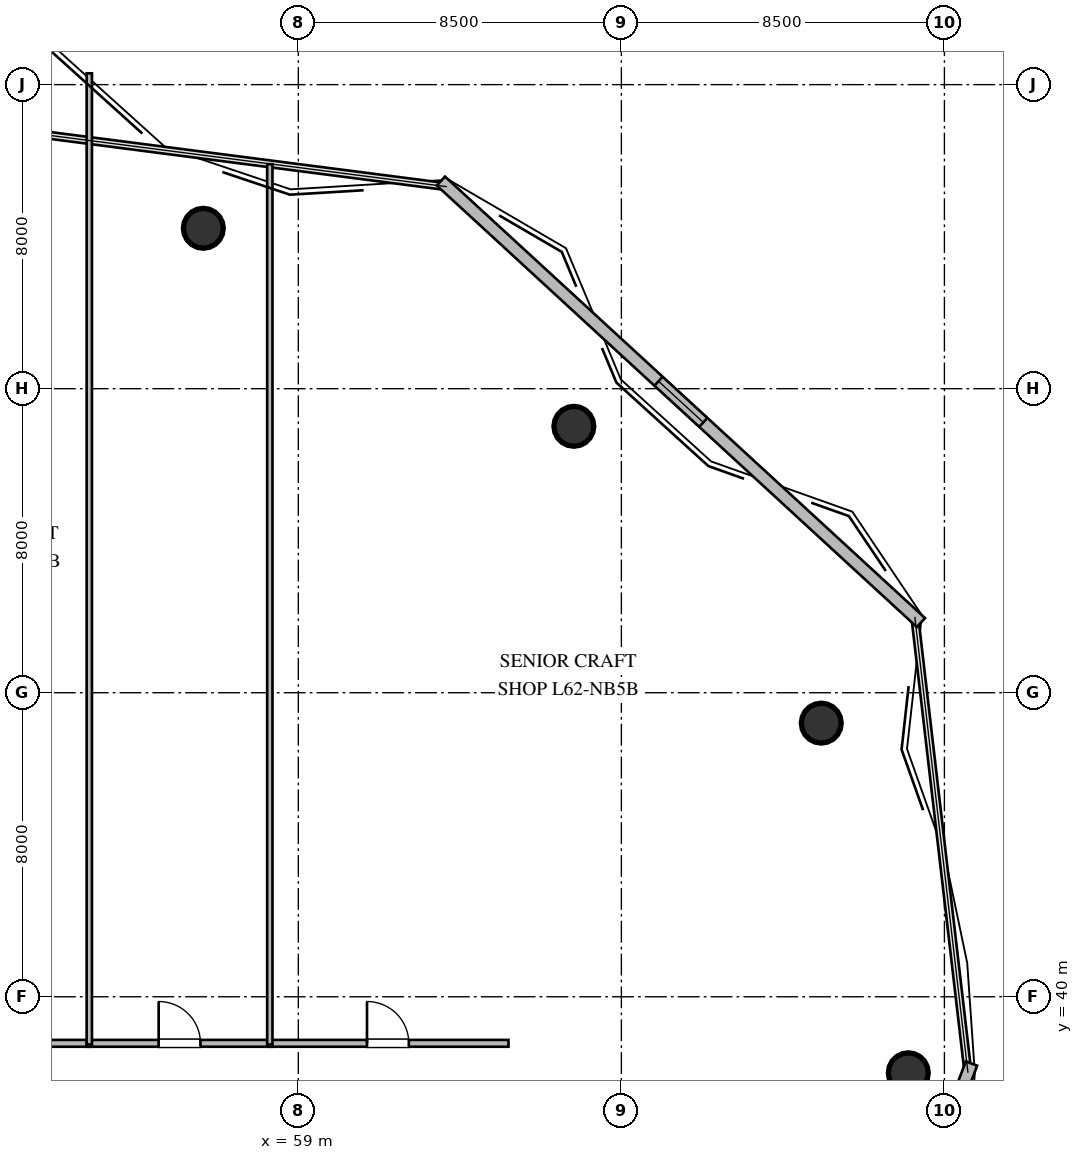
"""IFC4 building model, lengths in metres.
Left out: names, types, materials, properties, quantities, classifications, styles, units other than length and angle.
Written with IfcOpenShell. Run it as: python <this file> out.ifc"""

import sys

from ifc_helpers import new_model, si_unit, direction, frame, frame_2d, origin, origin_2d, place, context, subcontext, project, spatial, rectangle, circle, extrude, element, fill, save


model = new_model("IFC4")
c1 = context("Model", 3, precision=1e-05, world=origin(), true_north=direction((0.0, 1.0)))
c2 = subcontext(c1, "Body", "Model", "MODEL_VIEW")
j1 = project(units=[si_unit("LENGTHUNIT", "METRE"), si_unit("PLANEANGLEUNIT", "RADIAN")], contexts=[c1])
p1 = place(None, origin())
s1 = spatial("IfcSite", under=j1, at=p1, CompositionType="ELEMENT")
p2 = place(p1, origin())
s2 = spatial("IfcBuilding", under=s1, at=p2, CompositionType="ELEMENT")
p3 = place(p2, frame((0.0, 0.0, 235.2)))
s3 = spatial("IfcBuildingStorey", under=s2, at=p3, CompositionType="ELEMENT", Elevation=235.2)
for number, where, z_axis, x_axis in (
    (1, (75.05, 38.0, 0.0), (0.0, 0.0, 1.0), (1.0, 0.0, 0.0)),
    (2, (72.76, 47.2, 0.0), (0.0, 0.0, 1.0), (1.0, 0.0, 0.0)),
    (3, (66.25, 55.01, 0.0), (0.0, 0.0, 1.0), (1.0, 0.0, 0.0)),
    (4, (56.5, 60.22, 0.0), (0.0, 0.0, 1.0), (1.0, 0.0, 0.0)),
):
    element("IfcColumn", number, at=place(p3, frame(where, z_axis=z_axis, x_axis=x_axis)), inside=s3, PredefinedType="COLUMN", context=c2, shape_type="SweptSolid", body=[
        extrude(circle(Radius=0.525, at=origin_2d()), origin(), (0.0, 0.0, 1.0), 3.6),
    ])
p4 = place(p3, frame((76.712, 38.243, 0.0), z_axis=(0.0, 0.0, 1.0), x_axis=(-0.353659523244, -0.935374225441, 0.0)))
e5 = element("IfcWall", 5, at=p4, inside=s3, PredefinedType="STANDARD", context=c2, shape_type="SweptSolid", body=[
    extrude(rectangle(XDim=14.172, YDim=0.32, at=frame_2d((7.086, 0.0))), origin(), (0.0, 0.0, 1.0), 3.36),
])
p5 = place(p3, frame((62.751, 61.463, 0.0), z_axis=(0.0, 0.0, 1.0), x_axis=(0.736063690764, -0.676912286149, 0.0)))
e6 = element("IfcWall", 6, at=p5, inside=s3, PredefinedType="STANDARD", context=c2, shape_type="SweptSolid", body=[
    extrude(rectangle(XDim=17.162, YDim=0.32, at=frame_2d((8.581, 0.0))), origin(), (0.0, 0.0, 1.0), 3.36),
])
p6 = place(p5, frame((7.781, 0.0, 1.05)))
e7 = element("IfcOpeningElement", 7, at=p6, cuts=e6, PredefinedType="OPENING", context=c2, shape_type="SweptSolid", body=[
    extrude(rectangle(XDim=1.6, YDim=1.5, at=frame_2d((0.8, 0.75))), frame((0.0, 0.17, 0.0), z_axis=(0.0, -1.0, 0.0), x_axis=(1.0, 0.0, 0.0)), (0.0, 0.0, 1.0), 0.34),
])
p7 = place(p3, frame((48.185, 38.775, 0.0), z_axis=(0.0, 0.0, 1.0), x_axis=(1.0, 0.0, 0.0)))
e8 = element("IfcWall", 8, at=p7, inside=s3, PredefinedType="PARTITIONING", context=c2, shape_type="SweptSolid", body=[
    extrude(rectangle(XDim=5.38, YDim=0.18, at=frame_2d((2.69, 0.0))), origin(), (0.0, 0.0, 1.0), 3.36),
])
p8 = place(p7, frame((2.14, 0.0, 0.0)))
e9 = element("IfcOpeningElement", 9, at=p8, cuts=e8, PredefinedType="OPENING", context=c2, shape_type="SweptSolid", body=[
    extrude(rectangle(XDim=1.1, YDim=2.1, at=frame_2d((0.55, 1.05))), frame((0.0, 0.1, 0.0), z_axis=(0.0, -1.0, 0.0), x_axis=(1.0, 0.0, 0.0)), (0.0, 0.0, 1.0), 0.2),
])
p9 = place(p3, frame((53.435, 38.775, 0.0), z_axis=(0.0, 0.0, 1.0), x_axis=(1.0, 0.0, 0.0)))
e10 = element("IfcWall", 10, at=p9, inside=s3, PredefinedType="PARTITIONING", context=c2, shape_type="SweptSolid", body=[
    extrude(rectangle(XDim=4.88, YDim=0.18, at=frame_2d((2.44, 0.0))), origin(), (0.0, 0.0, 1.0), 3.36),
])
p10 = place(p9, frame((1.89, 0.0, 0.0)))
e11 = element("IfcOpeningElement", 11, at=p10, cuts=e10, PredefinedType="OPENING", context=c2, shape_type="SweptSolid", body=[
    extrude(rectangle(XDim=1.1, YDim=2.1, at=frame_2d((0.55, 1.05))), frame((0.0, 0.1, 0.0), z_axis=(0.0, -1.0, 0.0), x_axis=(1.0, 0.0, 0.0)), (0.0, 0.0, 1.0), 0.2),
])
p11 = place(p3, frame((58.185, 38.775, 0.0), z_axis=(0.0, 0.0, 1.0), x_axis=(1.0, 0.0, 0.0)))
e12 = element("IfcWall", 12, at=p11, inside=s3, PredefinedType="PARTITIONING", context=c2, shape_type="SweptSolid", body=[
    extrude(rectangle(XDim=6.345, YDim=0.18, at=frame_2d((3.172, 0.0))), origin(), (0.0, 0.0, 1.0), 3.36),
])
p12 = place(p11, frame((2.622, 0.0, 0.0)))
e13 = element("IfcOpeningElement", 13, at=p12, cuts=e12, PredefinedType="OPENING", context=c2, shape_type="SweptSolid", body=[
    extrude(rectangle(XDim=1.1, YDim=2.1, at=frame_2d((0.55, 1.05))), frame((0.0, 0.1, 0.0), z_axis=(0.0, -1.0, 0.0), x_axis=(1.0, 0.0, 0.0)), (0.0, 0.0, 1.0), 0.2),
])
p13 = place(p3, frame((53.5, 64.298, 0.0), z_axis=(0.0, 0.0, 1.0), x_axis=(0.0, -1.0, 0.0)))
e14 = element("IfcWall", 14, at=p13, inside=s3, PredefinedType="PARTITIONING", context=c2, shape_type="SweptSolid", body=[
    extrude(rectangle(XDim=25.553, YDim=0.14, at=frame_2d((12.776, 0.0))), origin(), (0.0, 0.0, 1.0), 3.36),
])
p14 = place(p3, frame((58.25, 61.906, 0.0), z_axis=(0.0, 0.0, 1.0), x_axis=(0.0, -1.0, 0.0)))
e15 = element("IfcWall", 15, at=p14, inside=s3, PredefinedType="PARTITIONING", context=c2, shape_type="SweptSolid", body=[
    extrude(rectangle(XDim=23.161, YDim=0.14, at=frame_2d((11.581, 0.0))), origin(), (0.0, 0.0, 1.0), 3.36),
])
p15 = place(p6, origin())
e16 = element("IfcWindow", 16, at=p15, inside=s3, PartitioningType="SINGLE_PANEL", PredefinedType="WINDOW", context=c2, shape_type="SweptSolid", body=[
    extrude(rectangle(XDim=1.6, YDim=1.5, at=frame_2d((0.8, 0.75))), frame((0.0, 0.03, 0.0), z_axis=(0.0, -1.0, 0.0), x_axis=(1.0, 0.0, 0.0)), (0.0, 0.0, 1.0), 0.06),
])
fill(e7, e16)
p16 = place(p10, origin())
e17 = element("IfcDoor", 17, at=p16, inside=s3, OperationType="SINGLE_SWING_LEFT", PredefinedType="DOOR", context=c2, shape_type="SweptSolid", body=[
    extrude(rectangle(XDim=1.1, YDim=2.1, at=frame_2d((0.55, 1.05))), frame((0.0, 0.025, 0.0), z_axis=(0.0, -1.0, 0.0), x_axis=(1.0, 0.0, 0.0)), (0.0, 0.0, 1.0), 0.05),
])
fill(e11, e17)
p17 = place(p12, origin())
e18 = element("IfcDoor", 18, at=p17, inside=s3, OperationType="SINGLE_SWING_LEFT", PredefinedType="DOOR", context=c2, shape_type="SweptSolid", body=[
    extrude(rectangle(XDim=1.1, YDim=2.1, at=frame_2d((0.55, 1.05))), frame((0.0, 0.025, 0.0), z_axis=(0.0, -1.0, 0.0), x_axis=(1.0, 0.0, 0.0)), (0.0, 0.0, 1.0), 0.05),
])
fill(e13, e18)
save(model, sys.argv[1])
